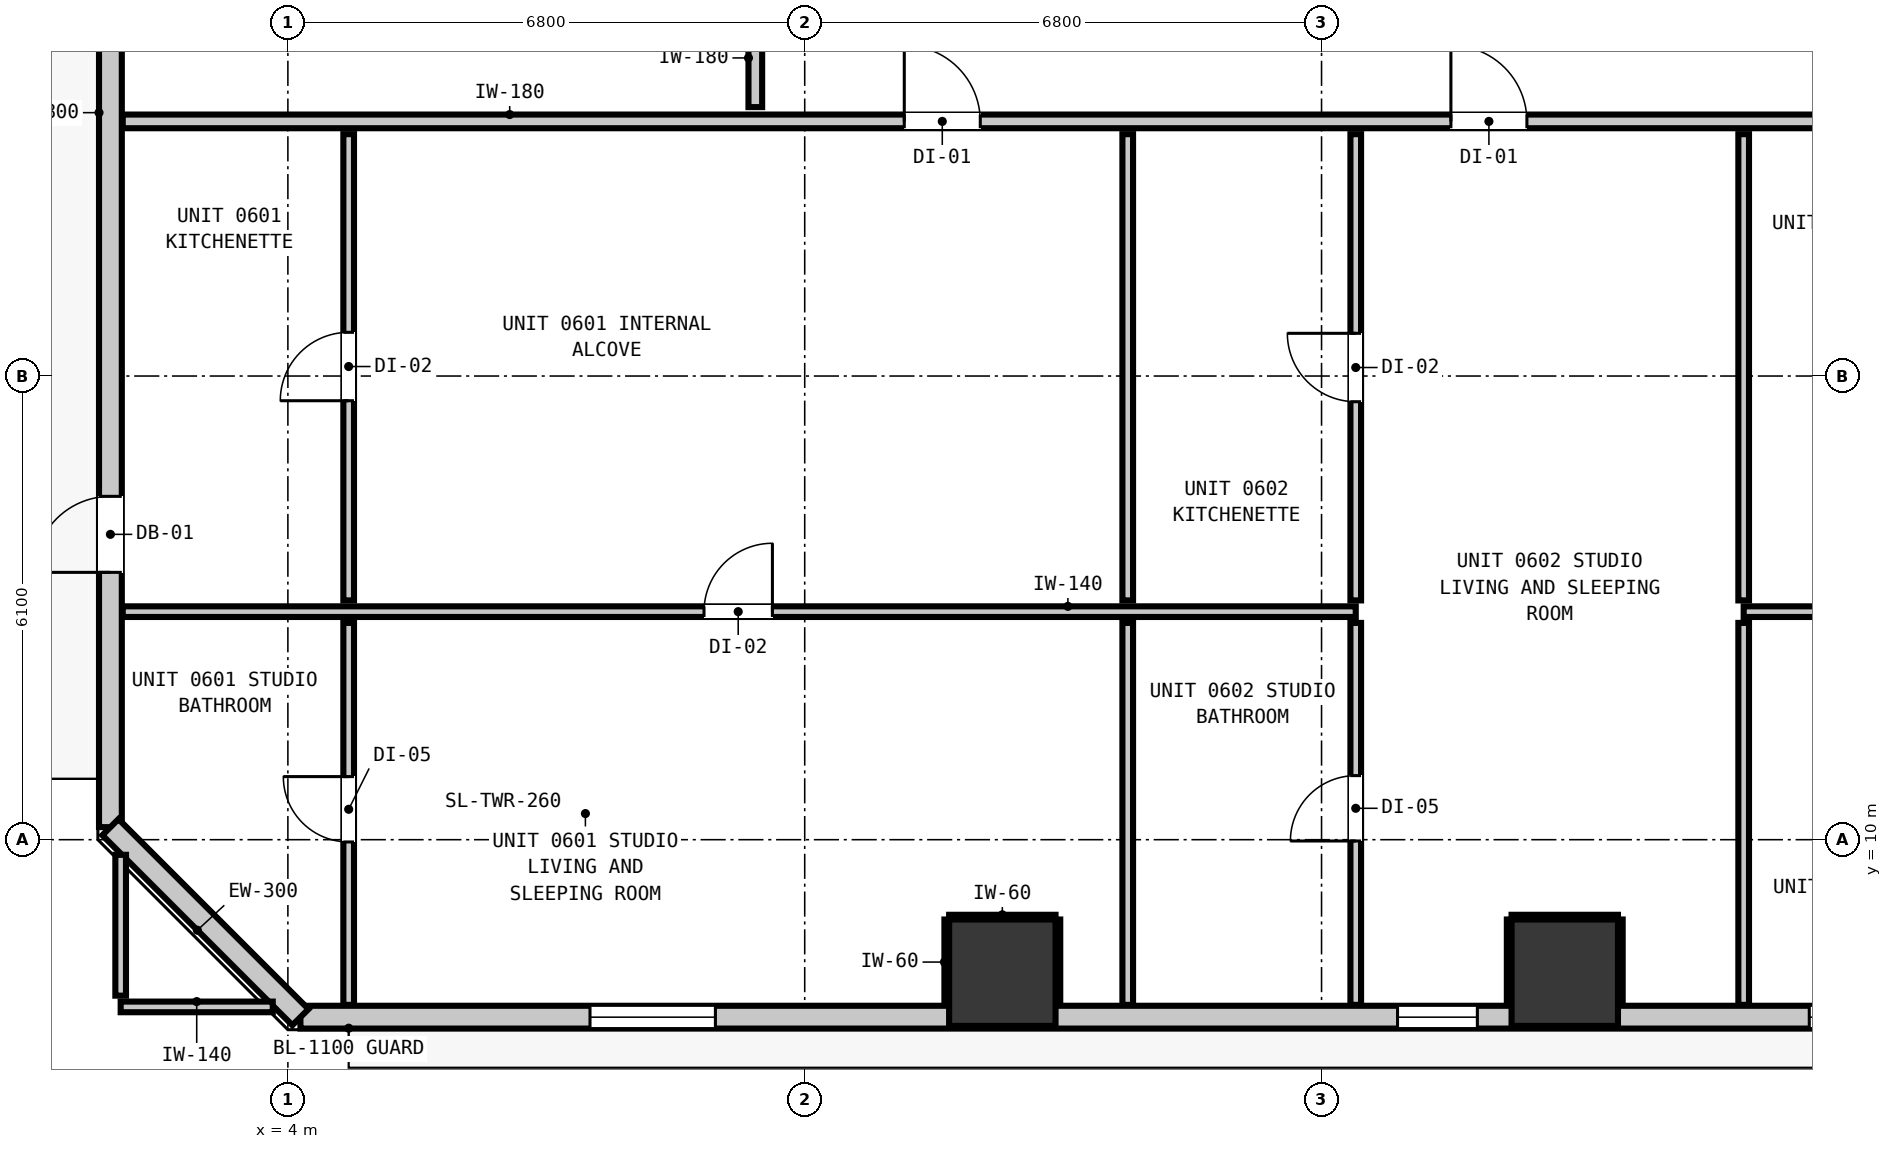
"""IFC4 building model, lengths in metres.
Left out: names, types, materials, properties, quantities, classifications, styles, units other than length and angle.
Written with IfcOpenShell. Run it as: python <this file> out.ifc"""

import sys

from ifc_helpers import new_model, si_unit, direction, frame, frame_2d, origin, origin_2d, place, context, subcontext, project, spatial, rectangle, extrude, element, fill, save


model = new_model("IFC4")
c1 = context("Model", 3, precision=1e-05, world=origin(), true_north=direction((0.0, 1.0)))
c2 = subcontext(c1, "Body", "Model", "MODEL_VIEW")
j1 = project(units=[si_unit("LENGTHUNIT", "METRE"), si_unit("PLANEANGLEUNIT", "RADIAN")], contexts=[c1])
p1 = place(None, origin())
s1 = spatial("IfcSite", under=j1, at=p1, CompositionType="ELEMENT")
p2 = place(p1, origin())
s2 = spatial("IfcBuilding", under=s1, at=p2, CompositionType="ELEMENT")
p3 = place(p2, frame((0.0, 0.0, 25.32)))
s3 = spatial("IfcBuildingStorey", under=s2, at=p3, CompositionType="ELEMENT", Elevation=25.32)
for number, where, z_axis, x_axis in (
    (1, (13.4, 8.25, 0.0), (0.0, 0.0, 1.0), (1.0, 0.0, 0.0)),
    (2, (20.8, 8.25, 0.0), (0.0, 0.0, 1.0), (1.0, 0.0, 0.0)),
):
    element("IfcColumn", number, at=place(p3, frame(where, z_axis=z_axis, x_axis=x_axis)), inside=s3, PredefinedType="COLUMN", context=c2, shape_type="SweptSolid", body=[
        extrude(rectangle(XDim=1.4, YDim=1.4, at=origin_2d()), origin(), (0.0, 0.0, 1.0), 3.32),
    ])
p4 = place(p3, frame((1.665, 10.165, 0.0), z_axis=(0.0, 0.0, 1.0), x_axis=(0.0, 1.0, 0.0)))
e3 = element("IfcWall", 3, at=p4, inside=s3, PredefinedType="STANDARD", context=c2, shape_type="SweptSolid", body=[
    extrude(rectangle(XDim=34.67, YDim=0.3, at=frame_2d((17.335, 0.0))), origin(), (0.0, 0.0, 1.0), 3.06),
])
p5 = place(p4, frame((3.352, 0.0, 0.0)))
e4 = element("IfcOpeningElement", 4, at=p5, cuts=e3, PredefinedType="OPENING", context=c2, shape_type="SweptSolid", body=[
    extrude(rectangle(XDim=1.0, YDim=2.15, at=frame_2d((0.5, 1.075))), frame((0.0, 0.16, 0.0), z_axis=(0.0, -1.0, 0.0), x_axis=(1.0, 0.0, 0.0)), (0.0, 0.0, 1.0), 0.32),
])
p6 = place(p4, frame((14.448, 0.0, 0.85)))
e5 = element("IfcOpeningElement", 5, at=p6, cuts=e3, PredefinedType="OPENING", context=c2, shape_type="SweptSolid", body=[
    extrude(rectangle(XDim=1.65, YDim=1.75, at=frame_2d((0.825, 0.875))), frame((0.0, 0.16, 0.0), z_axis=(0.0, -1.0, 0.0), x_axis=(1.0, 0.0, 0.0)), (0.0, 0.0, 1.0), 0.32),
])
p7 = place(p4, frame((17.598, 0.0, 0.85)))
e6 = element("IfcOpeningElement", 6, at=p7, cuts=e3, PredefinedType="OPENING", context=c2, shape_type="SweptSolid", body=[
    extrude(rectangle(XDim=1.65, YDim=1.75, at=frame_2d((0.825, 0.875))), frame((0.0, 0.16, 0.0), z_axis=(0.0, -1.0, 0.0), x_axis=(1.0, 0.0, 0.0)), (0.0, 0.0, 1.0), 0.32),
])
p8 = place(p4, frame((23.982, 0.0, 0.85)))
e7 = element("IfcOpeningElement", 7, at=p8, cuts=e3, PredefinedType="OPENING", context=c2, shape_type="SweptSolid", body=[
    extrude(rectangle(XDim=1.65, YDim=1.75, at=frame_2d((0.825, 0.875))), frame((0.0, 0.16, 0.0), z_axis=(0.0, -1.0, 0.0), x_axis=(1.0, 0.0, 0.0)), (0.0, 0.0, 1.0), 0.32),
])
p9 = place(p4, frame((27.333, 0.0, 0.85)))
e8 = element("IfcOpeningElement", 8, at=p9, cuts=e3, PredefinedType="OPENING", context=c2, shape_type="SweptSolid", body=[
    extrude(rectangle(XDim=1.05, YDim=1.65, at=frame_2d((0.525, 0.825))), frame((0.0, 0.16, 0.0), z_axis=(0.0, -1.0, 0.0), x_axis=(1.0, 0.0, 0.0)), (0.0, 0.0, 1.0), 0.32),
])
p10 = place(p3, frame((41.635, 7.665, 0.0), z_axis=(0.0, 0.0, 1.0), x_axis=(-1.0, 0.0, 0.0)))
e9 = element("IfcWall", 9, at=p10, inside=s3, PredefinedType="STANDARD", context=c2, shape_type="SweptSolid", body=[
    extrude(rectangle(XDim=37.47, YDim=0.3, at=frame_2d((18.735, 0.0))), origin(), (0.0, 0.0, 1.0), 3.06),
])
p11 = place(p10, frame((1.251, 0.0, 0.0)))
e10 = element("IfcOpeningElement", 10, at=p11, cuts=e9, PredefinedType="OPENING", context=c2, shape_type="SweptSolid", body=[
    extrude(rectangle(XDim=1.0, YDim=2.15, at=frame_2d((0.5, 1.075))), frame((0.0, 0.16, 0.0), z_axis=(0.0, -1.0, 0.0), x_axis=(1.0, 0.0, 0.0)), (0.0, 0.0, 1.0), 0.32),
])
p12 = place(p10, frame((32.01, 0.0, 0.85)))
e11 = element("IfcOpeningElement", 11, at=p12, cuts=e9, PredefinedType="OPENING", context=c2, shape_type="SweptSolid", body=[
    extrude(rectangle(XDim=1.65, YDim=1.75, at=frame_2d((0.825, 0.875))), frame((0.0, 0.16, 0.0), z_axis=(0.0, -1.0, 0.0), x_axis=(1.0, 0.0, 0.0)), (0.0, 0.0, 1.0), 0.32),
])
p13 = place(p10, frame((21.985, 0.0, 0.85)))
e12 = element("IfcOpeningElement", 12, at=p13, cuts=e9, PredefinedType="OPENING", context=c2, shape_type="SweptSolid", body=[
    extrude(rectangle(XDim=1.05, YDim=1.65, at=frame_2d((0.525, 0.825))), frame((0.0, 0.16, 0.0), z_axis=(0.0, -1.0, 0.0), x_axis=(1.0, 0.0, 0.0)), (0.0, 0.0, 1.0), 0.32),
])
p14 = place(p10, frame((13.545, 0.0, 0.85)))
e13 = element("IfcOpeningElement", 13, at=p14, cuts=e9, PredefinedType="OPENING", context=c2, shape_type="SweptSolid", body=[
    extrude(rectangle(XDim=1.05, YDim=1.65, at=frame_2d((0.525, 0.825))), frame((0.0, 0.16, 0.0), z_axis=(0.0, -1.0, 0.0), x_axis=(1.0, 0.0, 0.0)), (0.0, 0.0, 1.0), 0.32),
])
p15 = place(p10, frame((15.968, 0.0, 0.85)))
e14 = element("IfcOpeningElement", 14, at=p15, cuts=e9, PredefinedType="OPENING", context=c2, shape_type="SweptSolid", body=[
    extrude(rectangle(XDim=1.65, YDim=1.75, at=frame_2d((0.825, 0.875))), frame((0.0, 0.16, 0.0), z_axis=(0.0, -1.0, 0.0), x_axis=(1.0, 0.0, 0.0)), (0.0, 0.0, 1.0), 0.32),
])
p16 = place(p10, frame((2.618, 0.0, 0.85)))
e15 = element("IfcOpeningElement", 15, at=p16, cuts=e9, PredefinedType="OPENING", context=c2, shape_type="SweptSolid", body=[
    extrude(rectangle(XDim=1.65, YDim=1.75, at=frame_2d((0.825, 0.875))), frame((0.0, 0.16, 0.0), z_axis=(0.0, -1.0, 0.0), x_axis=(1.0, 0.0, 0.0)), (0.0, 0.0, 1.0), 0.32),
])
p17 = place(p3, frame((4.165, 7.665, 0.0), z_axis=(0.0, 0.0, 1.0), x_axis=(-0.707106781187, 0.707106781187, 0.0)))
e16 = element("IfcWall", 16, at=p17, inside=s3, PredefinedType="STANDARD", context=c2, shape_type="SweptSolid", body=[
    extrude(rectangle(XDim=3.536, YDim=0.3, at=frame_2d((1.768, 0.0))), origin(), (0.0, 0.0, 1.0), 3.06),
])
p18 = place(p3, frame((1.827, 19.45, 0.0), z_axis=(0.0, 0.0, 1.0), x_axis=(1.0, 0.0, 0.0)))
e17 = element("IfcWall", 17, at=p18, inside=s3, PredefinedType="PARTITIONING", context=c2, shape_type="SweptSolid", body=[
    extrude(rectangle(XDim=42.146, YDim=0.18, at=frame_2d((21.073, 0.0))), origin(), (0.0, 0.0, 1.0), 3.06),
])
p19 = place(p18, frame((10.283, 0.0, 0.0)))
e18 = element("IfcOpeningElement", 18, at=p19, cuts=e17, PredefinedType="OPENING", context=c2, shape_type="SweptSolid", body=[
    extrude(rectangle(XDim=1.0, YDim=2.15, at=frame_2d((0.5, 1.075))), frame((0.0, 0.1, 0.0), z_axis=(0.0, -1.0, 0.0), x_axis=(1.0, 0.0, 0.0)), (0.0, 0.0, 1.0), 0.2),
])
p20 = place(p18, frame((17.475, 0.0, 0.0)))
e19 = element("IfcOpeningElement", 19, at=p20, cuts=e17, PredefinedType="OPENING", context=c2, shape_type="SweptSolid", body=[
    extrude(rectangle(XDim=1.0, YDim=2.15, at=frame_2d((0.5, 1.075))), frame((0.0, 0.1, 0.0), z_axis=(0.0, -1.0, 0.0), x_axis=(1.0, 0.0, 0.0)), (0.0, 0.0, 1.0), 0.2),
])
p21 = place(p18, frame((25.928, 0.0, 0.0)))
e20 = element("IfcOpeningElement", 20, at=p21, cuts=e17, PredefinedType="OPENING", context=c2, shape_type="SweptSolid", body=[
    extrude(rectangle(XDim=1.0, YDim=2.15, at=frame_2d((0.5, 1.075))), frame((0.0, 0.1, 0.0), z_axis=(0.0, -1.0, 0.0), x_axis=(1.0, 0.0, 0.0)), (0.0, 0.0, 1.0), 0.2),
])
p22 = place(p18, frame((35.193, 0.0, 0.0)))
e21 = element("IfcOpeningElement", 21, at=p22, cuts=e17, PredefinedType="OPENING", context=c2, shape_type="SweptSolid", body=[
    extrude(rectangle(XDim=1.0, YDim=2.15, at=frame_2d((0.5, 1.075))), frame((0.0, 0.1, 0.0), z_axis=(0.0, -1.0, 0.0), x_axis=(1.0, 0.0, 0.0)), (0.0, 0.0, 1.0), 0.2),
])
p23 = place(p3, frame((1.8, 7.8, 0.0), z_axis=(0.0, 0.0, 1.0), x_axis=(1.0, 0.0, 0.0)))
e22 = element("IfcWall", 22, at=p23, inside=s3, PredefinedType="PARTITIONING", context=c2, shape_type="SweptSolid", body=[
    extrude(rectangle(XDim=2.001, YDim=0.14, at=frame_2d((1.0, 0.0))), origin(), (0.0, 0.0, 1.0), 3.06),
])
p24 = place(p3, frame((1.827, 13.0, 0.0), z_axis=(0.0, 0.0, 1.0), x_axis=(1.0, 0.0, 0.0)))
e23 = element("IfcWall", 23, at=p24, inside=s3, PredefinedType="PARTITIONING", context=c2, shape_type="SweptSolid", body=[
    extrude(rectangle(XDim=16.223, YDim=0.14, at=frame_2d((8.112, 0.0))), origin(), (0.0, 0.0, 1.0), 3.06),
])
p25 = place(p24, frame((7.648, 0.0, 0.0)))
e24 = element("IfcOpeningElement", 24, at=p25, cuts=e23, PredefinedType="OPENING", context=c2, shape_type="SweptSolid", body=[
    extrude(rectangle(XDim=0.9, YDim=2.1, at=frame_2d((0.45, 1.05))), frame((0.0, 0.08, 0.0), z_axis=(0.0, -1.0, 0.0), x_axis=(1.0, 0.0, 0.0)), (0.0, 0.0, 1.0), 0.16),
])
p26 = place(p3, frame((23.154, 13.0, 0.0), z_axis=(0.0, 0.0, 1.0), x_axis=(1.0, 0.0, 0.0)))
e25 = element("IfcWall", 25, at=p26, inside=s3, PredefinedType="PARTITIONING", context=c2, shape_type="SweptSolid", body=[
    extrude(rectangle(XDim=3.375, YDim=0.14, at=frame_2d((1.688, 0.0))), origin(), (0.0, 0.0, 1.0), 3.06),
])
p27 = place(p3, frame((10.15, 19.638, 0.0), z_axis=(0.0, 0.0, 1.0), x_axis=(0.0, 1.0, 0.0)))
e26 = element("IfcWall", 26, at=p27, inside=s3, PredefinedType="PARTITIONING", context=c2, shape_type="SweptSolid", body=[
    extrude(rectangle(XDim=1.294, YDim=0.18, at=frame_2d((0.647, 0.0))), origin(), (0.0, 0.0, 1.0), 3.06),
])
p28 = place(p3, frame((1.8, 7.948, 0.0), z_axis=(0.0, 0.0, 1.0), x_axis=(0.0, 1.0, 0.0)))
e27 = element("IfcWall", 27, at=p28, inside=s3, PredefinedType="PARTITIONING", context=c2, shape_type="SweptSolid", body=[
    extrude(rectangle(XDim=1.853, YDim=0.14, at=frame_2d((0.927, 0.0))), origin(), (0.0, 0.0, 1.0), 3.06),
])
p29 = place(p3, frame((4.8, 7.827, 0.0), z_axis=(0.0, 0.0, 1.0), x_axis=(0.0, 1.0, 0.0)))
e28 = element("IfcWall", 28, at=p29, inside=s3, PredefinedType="PARTITIONING", context=c2, shape_type="SweptSolid", body=[
    extrude(rectangle(XDim=5.025, YDim=0.14, at=frame_2d((2.513, 0.0))), origin(), (0.0, 0.0, 1.0), 3.06),
])
p30 = place(p29, frame((2.143, 0.0, 0.0)))
e29 = element("IfcOpeningElement", 29, at=p30, cuts=e28, PredefinedType="OPENING", context=c2, shape_type="SweptSolid", body=[
    extrude(rectangle(XDim=0.86, YDim=2.02, at=frame_2d((0.43, 1.01))), frame((0.0, 0.08, 0.0), z_axis=(0.0, -1.0, 0.0), x_axis=(1.0, 0.0, 0.0)), (0.0, 0.0, 1.0), 0.16),
])
p31 = place(p3, frame((4.8, 13.148, 0.0), z_axis=(0.0, 0.0, 1.0), x_axis=(0.0, 1.0, 0.0)))
e30 = element("IfcWall", 30, at=p31, inside=s3, PredefinedType="PARTITIONING", context=c2, shape_type="SweptSolid", body=[
    extrude(rectangle(XDim=6.134, YDim=0.14, at=frame_2d((3.067, 0.0))), origin(), (0.0, 0.0, 1.0), 3.06),
])
p32 = place(p31, frame((2.627, 0.0, 0.0)))
e31 = element("IfcOpeningElement", 31, at=p32, cuts=e30, PredefinedType="OPENING", context=c2, shape_type="SweptSolid", body=[
    extrude(rectangle(XDim=0.9, YDim=2.1, at=frame_2d((0.45, 1.05))), frame((0.0, 0.08, 0.0), z_axis=(0.0, -1.0, 0.0), x_axis=(1.0, 0.0, 0.0)), (0.0, 0.0, 1.0), 0.16),
])
p33 = place(p3, frame((15.05, 7.827, 0.0), z_axis=(0.0, 0.0, 1.0), x_axis=(0.0, 1.0, 0.0)))
e32 = element("IfcWall", 32, at=p33, inside=s3, PredefinedType="PARTITIONING", context=c2, shape_type="SweptSolid", body=[
    extrude(rectangle(XDim=5.025, YDim=0.14, at=frame_2d((2.513, 0.0))), origin(), (0.0, 0.0, 1.0), 3.06),
])
p34 = place(p3, frame((15.05, 13.148, 0.0), z_axis=(0.0, 0.0, 1.0), x_axis=(0.0, 1.0, 0.0)))
e33 = element("IfcWall", 33, at=p34, inside=s3, PredefinedType="PARTITIONING", context=c2, shape_type="SweptSolid", body=[
    extrude(rectangle(XDim=6.134, YDim=0.14, at=frame_2d((3.067, 0.0))), origin(), (0.0, 0.0, 1.0), 3.06),
])
p35 = place(p3, frame((18.05, 7.827, 0.0), z_axis=(0.0, 0.0, 1.0), x_axis=(0.0, 1.0, 0.0)))
e34 = element("IfcWall", 34, at=p35, inside=s3, PredefinedType="PARTITIONING", context=c2, shape_type="SweptSolid", body=[
    extrude(rectangle(XDim=5.025, YDim=0.14, at=frame_2d((2.513, 0.0))), origin(), (0.0, 0.0, 1.0), 3.06),
])
p36 = place(p35, frame((2.156, 0.0, 0.0)))
e35 = element("IfcOpeningElement", 35, at=p36, cuts=e34, PredefinedType="OPENING", context=c2, shape_type="SweptSolid", body=[
    extrude(rectangle(XDim=0.86, YDim=2.02, at=frame_2d((0.43, 1.01))), frame((0.0, 0.08, 0.0), z_axis=(0.0, -1.0, 0.0), x_axis=(1.0, 0.0, 0.0)), (0.0, 0.0, 1.0), 0.16),
])
p37 = place(p3, frame((18.05, 13.148, 0.0), z_axis=(0.0, 0.0, 1.0), x_axis=(0.0, 1.0, 0.0)))
e36 = element("IfcWall", 36, at=p37, inside=s3, PredefinedType="PARTITIONING", context=c2, shape_type="SweptSolid", body=[
    extrude(rectangle(XDim=6.134, YDim=0.14, at=frame_2d((3.067, 0.0))), origin(), (0.0, 0.0, 1.0), 3.06),
])
p38 = place(p37, frame((2.614, 0.0, 0.0)))
e37 = element("IfcOpeningElement", 37, at=p38, cuts=e36, PredefinedType="OPENING", context=c2, shape_type="SweptSolid", body=[
    extrude(rectangle(XDim=0.9, YDim=2.1, at=frame_2d((0.45, 1.05))), frame((0.0, 0.08, 0.0), z_axis=(0.0, -1.0, 0.0), x_axis=(1.0, 0.0, 0.0)), (0.0, 0.0, 1.0), 0.16),
])
p39 = place(p3, frame((23.154, 7.827, 0.0), z_axis=(0.0, 0.0, 1.0), x_axis=(0.0, 1.0, 0.0)))
e38 = element("IfcWall", 38, at=p39, inside=s3, PredefinedType="PARTITIONING", context=c2, shape_type="SweptSolid", body=[
    extrude(rectangle(XDim=5.025, YDim=0.14, at=frame_2d((2.513, 0.0))), origin(), (0.0, 0.0, 1.0), 3.06),
])
p40 = place(p3, frame((23.154, 13.148, 0.0), z_axis=(0.0, 0.0, 1.0), x_axis=(0.0, 1.0, 0.0)))
e39 = element("IfcWall", 39, at=p40, inside=s3, PredefinedType="PARTITIONING", context=c2, shape_type="SweptSolid", body=[
    extrude(rectangle(XDim=6.134, YDim=0.14, at=frame_2d((3.067, 0.0))), origin(), (0.0, 0.0, 1.0), 3.06),
])
p41 = place(p3, frame((12.7, 8.982, 0.0), z_axis=(0.0, 0.0, 1.0), x_axis=(1.0, 0.0, 0.0)))
e40 = element("IfcWall", 40, at=p41, inside=s3, PredefinedType="PARTITIONING", context=c2, shape_type="SweptSolid", body=[
    extrude(rectangle(XDim=1.4, YDim=0.06, at=frame_2d((0.7, 0.0))), origin(), (0.0, 0.0, 1.0), 1.45),
])
for number, where, z_axis, x_axis in (
    (41, (12.668, 7.83, 0.0), (0.0, 0.0, 1.0), (0.0, 1.0, 0.0)),
    (42, (14.132, 7.83, 0.0), (0.0, 0.0, 1.0), (0.0, 1.0, 0.0)),
):
    element("IfcWall", number, at=place(p3, frame(where, z_axis=z_axis, x_axis=x_axis)), inside=s3, PredefinedType="PARTITIONING", context=c2, shape_type="SweptSolid", body=[
        extrude(rectangle(XDim=1.12, YDim=0.06, at=frame_2d((0.56, 0.0))), origin(), (0.0, 0.0, 1.0), 1.45),
    ])
p42 = place(p3, frame((20.1, 8.982, 0.0), z_axis=(0.0, 0.0, 1.0), x_axis=(1.0, 0.0, 0.0)))
e43 = element("IfcWall", 43, at=p42, inside=s3, PredefinedType="PARTITIONING", context=c2, shape_type="SweptSolid", body=[
    extrude(rectangle(XDim=1.4, YDim=0.06, at=frame_2d((0.7, 0.0))), origin(), (0.0, 0.0, 1.0), 1.45),
])
for number, where, z_axis, x_axis in (
    (44, (20.068, 7.83, 0.0), (0.0, 0.0, 1.0), (0.0, 1.0, 0.0)),
    (45, (21.532, 7.83, 0.0), (0.0, 0.0, 1.0), (0.0, 1.0, 0.0)),
):
    element("IfcWall", number, at=place(p3, frame(where, z_axis=z_axis, x_axis=x_axis)), inside=s3, PredefinedType="PARTITIONING", context=c2, shape_type="SweptSolid", body=[
        extrude(rectangle(XDim=1.12, YDim=0.06, at=frame_2d((0.56, 0.0))), origin(), (0.0, 0.0, 1.0), 1.45),
    ])
p43 = place(p5, origin())
e46 = element("IfcDoor", 46, at=p43, inside=s3, OperationType="SINGLE_SWING_LEFT", PredefinedType="DOOR", context=c2, shape_type="SweptSolid", body=[
    extrude(rectangle(XDim=1.0, YDim=2.15, at=frame_2d((0.5, 1.075))), frame((0.0, 0.025, 0.0), z_axis=(0.0, -1.0, 0.0), x_axis=(1.0, 0.0, 0.0)), (0.0, 0.0, 1.0), 0.05),
])
fill(e4, e46)
p44 = place(p12, origin())
e47 = element("IfcWindow", 47, at=p44, inside=s3, PartitioningType="SINGLE_PANEL", PredefinedType="WINDOW", context=c2, shape_type="SweptSolid", body=[
    extrude(rectangle(XDim=1.65, YDim=1.75, at=frame_2d((0.825, 0.875))), frame((0.0, 0.03, 0.0), z_axis=(0.0, -1.0, 0.0), x_axis=(1.0, 0.0, 0.0)), (0.0, 0.0, 1.0), 0.06),
])
fill(e11, e47)
p45 = place(p13, origin())
e48 = element("IfcWindow", 48, at=p45, inside=s3, PartitioningType="SINGLE_PANEL", PredefinedType="WINDOW", context=c2, shape_type="SweptSolid", body=[
    extrude(rectangle(XDim=1.05, YDim=1.65, at=frame_2d((0.525, 0.825))), frame((0.0, 0.03, 0.0), z_axis=(0.0, -1.0, 0.0), x_axis=(1.0, 0.0, 0.0)), (0.0, 0.0, 1.0), 0.06),
])
fill(e12, e48)
p46 = place(p15, origin())
e49 = element("IfcWindow", 49, at=p46, inside=s3, PartitioningType="SINGLE_PANEL", PredefinedType="WINDOW", context=c2, shape_type="SweptSolid", body=[
    extrude(rectangle(XDim=1.65, YDim=1.75, at=frame_2d((0.825, 0.875))), frame((0.0, 0.03, 0.0), z_axis=(0.0, -1.0, 0.0), x_axis=(1.0, 0.0, 0.0)), (0.0, 0.0, 1.0), 0.06),
])
fill(e14, e49)
p47 = place(p19, origin())
e50 = element("IfcDoor", 50, at=p47, inside=s3, OperationType="SINGLE_SWING_LEFT", PredefinedType="DOOR", context=c2, shape_type="SweptSolid", body=[
    extrude(rectangle(XDim=1.0, YDim=2.15, at=frame_2d((0.5, 1.075))), frame((0.0, 0.025, 0.0), z_axis=(0.0, -1.0, 0.0), x_axis=(1.0, 0.0, 0.0)), (0.0, 0.0, 1.0), 0.05),
])
fill(e18, e50)
p48 = place(p25, origin())
e51 = element("IfcDoor", 51, at=p48, inside=s3, OperationType="SINGLE_SWING_RIGHT", PredefinedType="DOOR", context=c2, shape_type="SweptSolid", body=[
    extrude(rectangle(XDim=0.9, YDim=2.1, at=frame_2d((0.45, 1.05))), frame((0.0, 0.025, 0.0), z_axis=(0.0, -1.0, 0.0), x_axis=(1.0, 0.0, 0.0)), (0.0, 0.0, 1.0), 0.05),
])
fill(e24, e51)
p49 = place(p32, origin())
e52 = element("IfcDoor", 52, at=p49, inside=s3, OperationType="SINGLE_SWING_LEFT", PredefinedType="DOOR", context=c2, shape_type="SweptSolid", body=[
    extrude(rectangle(XDim=0.9, YDim=2.1, at=frame_2d((0.45, 1.05))), frame((0.0, 0.025, 0.0), z_axis=(0.0, -1.0, 0.0), x_axis=(1.0, 0.0, 0.0)), (0.0, 0.0, 1.0), 0.05),
])
fill(e31, e52)
p50 = place(p30, origin())
e53 = element("IfcDoor", 53, at=p50, inside=s3, OperationType="SINGLE_SWING_RIGHT", PredefinedType="DOOR", context=c2, shape_type="SweptSolid", body=[
    extrude(rectangle(XDim=0.86, YDim=2.02, at=frame_2d((0.43, 1.01))), frame((0.0, 0.025, 0.0), z_axis=(0.0, -1.0, 0.0), x_axis=(1.0, 0.0, 0.0)), (0.0, 0.0, 1.0), 0.05),
])
fill(e29, e53)
p51 = place(p20, origin())
e54 = element("IfcDoor", 54, at=p51, inside=s3, OperationType="SINGLE_SWING_LEFT", PredefinedType="DOOR", context=c2, shape_type="SweptSolid", body=[
    extrude(rectangle(XDim=1.0, YDim=2.15, at=frame_2d((0.5, 1.075))), frame((0.0, 0.025, 0.0), z_axis=(0.0, -1.0, 0.0), x_axis=(1.0, 0.0, 0.0)), (0.0, 0.0, 1.0), 0.05),
])
fill(e19, e54)
p52 = place(p38, origin())
e55 = element("IfcDoor", 55, at=p52, inside=s3, OperationType="SINGLE_SWING_RIGHT", PredefinedType="DOOR", context=c2, shape_type="SweptSolid", body=[
    extrude(rectangle(XDim=0.9, YDim=2.1, at=frame_2d((0.45, 1.05))), frame((0.0, 0.025, 0.0), z_axis=(0.0, -1.0, 0.0), x_axis=(1.0, 0.0, 0.0)), (0.0, 0.0, 1.0), 0.05),
])
fill(e37, e55)
p53 = place(p36, origin())
e56 = element("IfcDoor", 56, at=p53, inside=s3, OperationType="SINGLE_SWING_LEFT", PredefinedType="DOOR", context=c2, shape_type="SweptSolid", body=[
    extrude(rectangle(XDim=0.86, YDim=2.02, at=frame_2d((0.43, 1.01))), frame((0.0, 0.025, 0.0), z_axis=(0.0, -1.0, 0.0), x_axis=(1.0, 0.0, 0.0)), (0.0, 0.0, 1.0), 0.05),
])
fill(e35, e56)
save(model, sys.argv[1])
